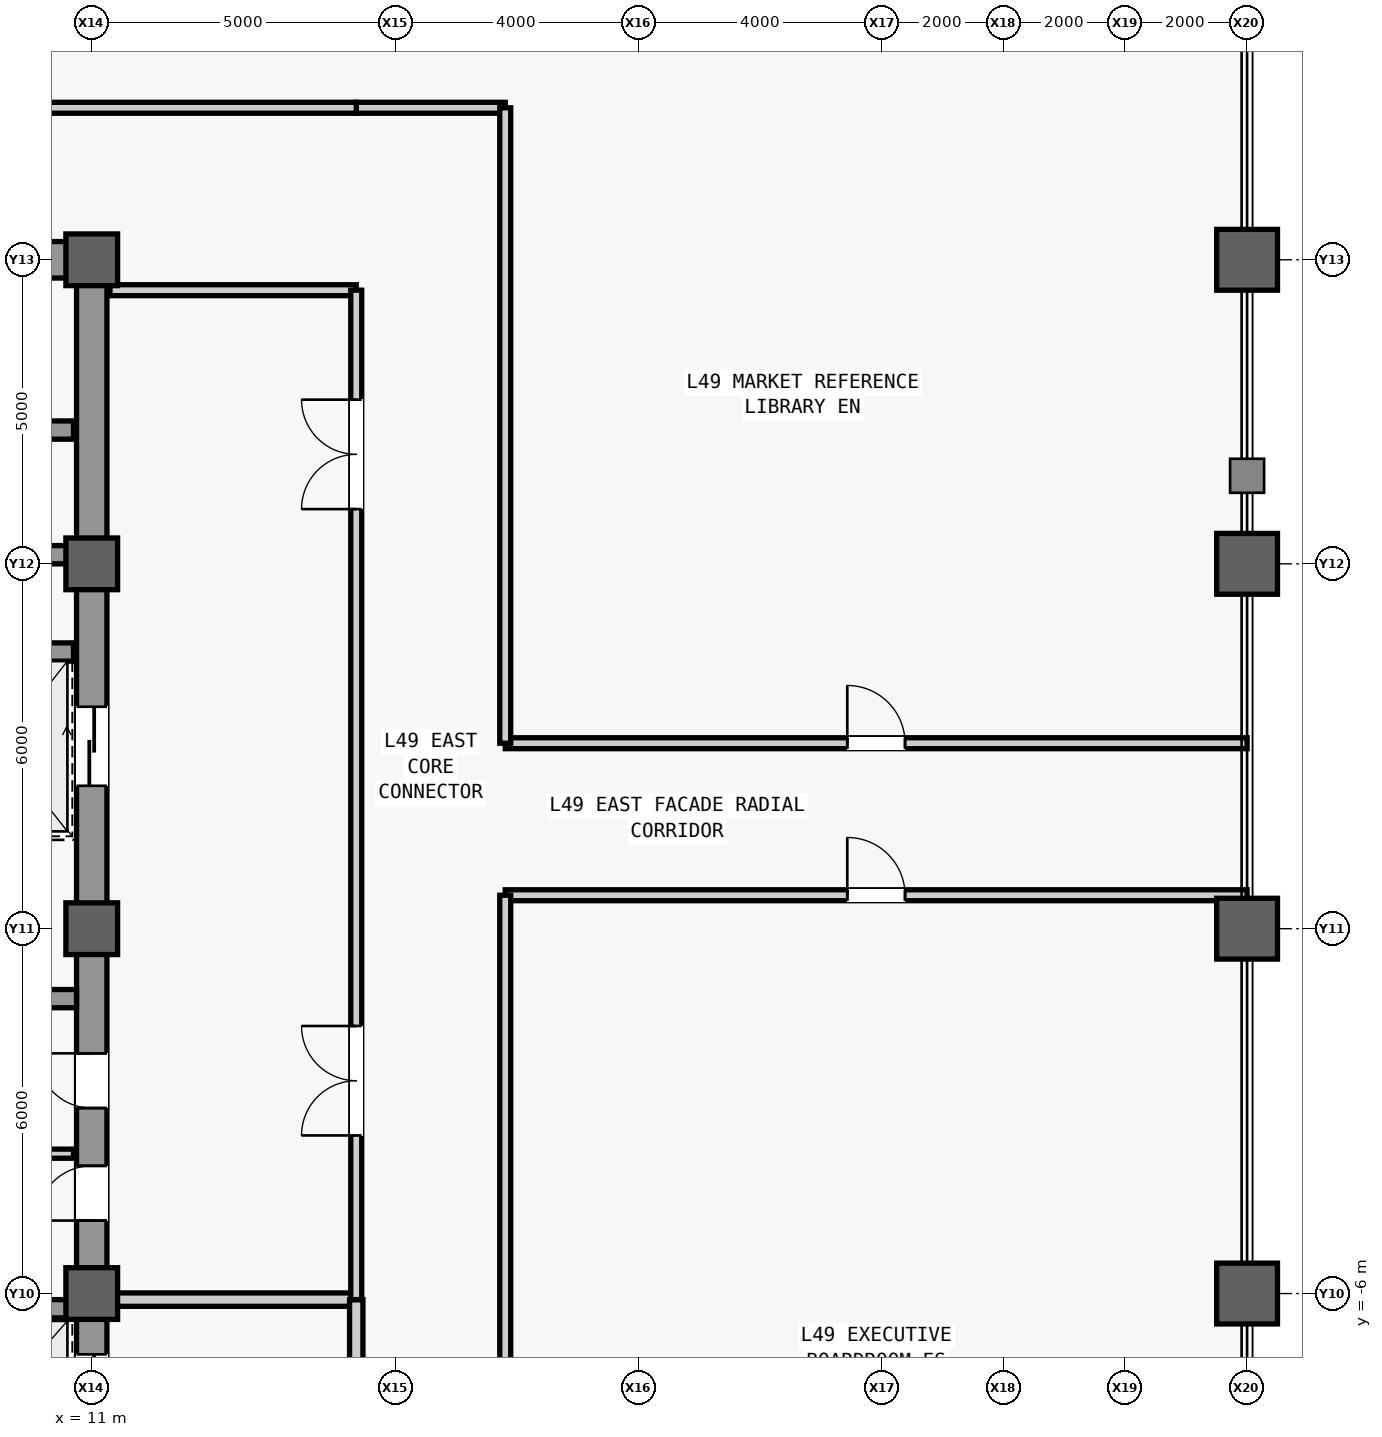
"""IFC4 building model, lengths in metres.
Left out: names, types, materials, properties, quantities, classifications, styles, units other than length and angle.
Written with IfcOpenShell. Run it as: python <this file> out.ifc"""

import sys

from ifc_helpers import new_model, si_unit, direction, frame, frame_2d, origin, origin_2d, place, context, subcontext, project, spatial, rectangle, hollow_rectangle, extrude, source, transform, mapped, element, fill, save


model = new_model("IFC4")
c1 = context("Model", 3, precision=1e-05, world=origin(), true_north=direction((0.0, 1.0)))
c2 = subcontext(c1, "Body", "Model", "MODEL_VIEW")
j1 = project(units=[si_unit("LENGTHUNIT", "METRE"), si_unit("PLANEANGLEUNIT", "RADIAN")], contexts=[c1])
p1 = place(None, origin())
s1 = spatial("IfcSite", under=j1, at=p1, CompositionType="ELEMENT")
p2 = place(p1, origin())
s2 = spatial("IfcBuilding", under=s1, at=p2, CompositionType="ELEMENT")
p3 = place(p2, frame((0.0, 0.0, 211.1)))
s3 = spatial("IfcBuildingStorey", under=s2, at=p3, CompositionType="ELEMENT", Elevation=211.1)
m1 = source(origin(), c2, "Body", "SweptSolid", [
    extrude(rectangle(XDim=22.0, YDim=0.5, at=frame_2d((11.0, 0.0))), origin(), (0.0, 0.0, 1.0), 3.78),
])
p4 = place(p3, frame((11.0, -11.0, 0.0), z_axis=(0.0, 0.0, 1.0), x_axis=(0.0, 1.0, 0.0)))
e1 = element("IfcWall", 1, at=p4, inside=s3, PredefinedType="SHEAR", context=c2, shape_type="MappedRepresentation", body=[
    mapped(m1, transform((0.0, 0.0, 0.0), scale=1.0)),
])
m2 = source(origin(), c2, "Body", "SweptSolid", [
    extrude(rectangle(XDim=1.1, YDim=2.2, at=frame_2d((0.55, 1.1))), frame((0.0, 0.26, 0.0), z_axis=(0.0, -1.0, 0.0), x_axis=(1.0, 0.0, 0.0)), (0.0, 0.0, 1.0), 0.52),
])
p5 = place(p4, frame((0.8, 0.0, 0.0)))
e2 = element("IfcOpeningElement", 2, at=p5, cuts=e1, PredefinedType="OPENING", context=c2, shape_type="MappedRepresentation", body=[
    mapped(m2, transform((0.0, 0.0, 0.0), scale=1.0)),
])
m3 = source(origin(), c2, "Body", "SweptSolid", [
    extrude(rectangle(XDim=0.9, YDim=2.15, at=frame_2d((0.45, 1.075))), frame((0.0, 0.26, 0.0), z_axis=(0.0, -1.0, 0.0), x_axis=(1.0, 0.0, 0.0)), (0.0, 0.0, 1.0), 0.52),
])
p6 = place(p4, frame((6.2, 0.0, 0.0)))
e3 = element("IfcOpeningElement", 3, at=p6, cuts=e1, PredefinedType="OPENING", context=c2, shape_type="MappedRepresentation", body=[
    mapped(m3, transform((0.0, 0.0, 0.0), scale=1.0)),
])
p7 = place(p4, frame((8.05, 0.0, 0.0)))
e4 = element("IfcOpeningElement", 4, at=p7, cuts=e1, PredefinedType="OPENING", context=c2, shape_type="MappedRepresentation", body=[
    mapped(m3, transform((0.0, 0.0, 0.0), scale=1.0)),
])
m4 = source(origin(), c2, "Body", "SweptSolid", [
    extrude(rectangle(XDim=1.3, YDim=2.3, at=frame_2d((0.65, 1.15))), frame((0.0, 0.26, 0.0), z_axis=(0.0, -1.0, 0.0), x_axis=(1.0, 0.0, 0.0)), (0.0, 0.0, 1.0), 0.52),
])
p8 = place(p4, frame((2.7, 0.0, 0.0)))
e5 = element("IfcOpeningElement", 5, at=p8, cuts=e1, PredefinedType="OPENING", context=c2, shape_type="MappedRepresentation", body=[
    mapped(m4, transform((0.0, 0.0, 0.0), scale=1.0)),
])
p9 = place(p4, frame((13.35, 0.0, 0.0)))
e6 = element("IfcOpeningElement", 6, at=p9, cuts=e1, PredefinedType="OPENING", context=c2, shape_type="MappedRepresentation", body=[
    mapped(m4, transform((0.0, 0.0, 0.0), scale=1.0)),
])
m5 = source(origin(), c2, "Body", "SweptSolid", [
    extrude(rectangle(XDim=5.9, YDim=0.6, at=frame_2d((2.95, 0.0))), origin(), (0.0, 0.0, 1.0), 3.78),
])
p10 = place(p3, frame((4.85, 11.0, 0.0), z_axis=(0.0, 0.0, 1.0), x_axis=(1.0, 0.0, 0.0)))
e7 = element("IfcWall", 7, at=p10, inside=s3, PredefinedType="SHEAR", context=c2, shape_type="MappedRepresentation", body=[
    mapped(m5, transform((0.0, 0.0, 0.0), scale=1.0)),
])
m6 = source(origin(), c2, "Body", "SweptSolid", [
    extrude(rectangle(XDim=1.05, YDim=2.2, at=frame_2d((0.525, 1.1))), frame((0.0, 0.31, 0.0), z_axis=(0.0, -1.0, 0.0), x_axis=(1.0, 0.0, 0.0)), (0.0, 0.0, 1.0), 0.62),
])
p11 = place(p10, frame((1.375, 0.0, 0.0)))
e8 = element("IfcOpeningElement", 8, at=p11, cuts=e7, PredefinedType="OPENING", context=c2, shape_type="MappedRepresentation", body=[
    mapped(m6, transform((0.0, 0.0, 0.0), scale=1.0)),
])
m7 = source(origin(), c2, "Body", "SweptSolid", [
    extrude(rectangle(XDim=5.65, YDim=0.3, at=frame_2d((2.825, 0.0))), origin(), (0.0, 0.0, 1.0), 3.78),
])
p12 = place(p3, frame((5.1, -1.15, 0.0), z_axis=(0.0, 0.0, 1.0), x_axis=(1.0, 0.0, 0.0)))
e9 = element("IfcWall", 9, at=p12, inside=s3, PredefinedType="SHEAR", context=c2, shape_type="MappedRepresentation", body=[
    mapped(m7, transform((0.0, 0.0, 0.0), scale=1.0)),
])
m8 = source(origin(), c2, "Body", "SweptSolid", [
    extrude(rectangle(XDim=0.85, YDim=0.85, at=origin_2d()), origin(), (0.0, 0.0, 1.0), 4.0),
])
for number, where, z_axis, x_axis in (
    (10, (11.0, -6.0, 0.0), (0.0, 0.0, 1.0), (1.0, 0.0, 0.0)),
    (11, (11.0, 0.0, 0.0), (0.0, 0.0, 1.0), (1.0, 0.0, 0.0)),
    (12, (11.0, 6.0, 0.0), (0.0, 0.0, 1.0), (1.0, 0.0, 0.0)),
    (13, (11.0, 11.0, 0.0), (0.0, 0.0, 1.0), (1.0, 0.0, 0.0)),
):
    element("IfcColumn", number, at=place(p3, frame(where, z_axis=z_axis, x_axis=x_axis)), inside=s3, PredefinedType="COLUMN", context=c2, shape_type="MappedRepresentation", body=[
        mapped(m8, transform((0.0, 0.0, 0.0), scale=1.0)),
    ])
m9 = source(origin(), c2, "Body", "SweptSolid", [
    extrude(hollow_rectangle(XDim=1.0, YDim=1.0, WallThickness=0.055, at=origin_2d()), origin(), (0.0, 0.0, 1.0), 4.0),
])
for number, where, z_axis, x_axis in (
    (14, (30.0, -6.0, 0.0), (0.0, 0.0, 1.0), (1.0, 0.0, 0.0)),
    (15, (30.0, 0.0, 0.0), (0.0, 0.0, 1.0), (1.0, 0.0, 0.0)),
    (16, (30.0, 6.0, 0.0), (0.0, 0.0, 1.0), (1.0, 0.0, 0.0)),
    (17, (30.0, 11.0, 0.0), (0.0, 0.0, 1.0), (1.0, 0.0, 0.0)),
):
    element("IfcColumn", number, at=place(p3, frame(where, z_axis=z_axis, x_axis=x_axis)), inside=s3, PredefinedType="COLUMN", context=c2, shape_type="MappedRepresentation", body=[
        mapped(m9, transform((0.0, 0.0, 0.0), scale=1.0)),
    ])
m10 = source(origin(), c2, "Body", "SweptSolid", [
    extrude(rectangle(XDim=2.2, YDim=0.3, at=frame_2d((1.1, 0.0))), origin(), (0.0, 0.0, 1.0), 3.78),
])
p13 = place(p3, frame((8.5, -6.25, 0.0), z_axis=(0.0, 0.0, 1.0), x_axis=(1.0, 0.0, 0.0)))
e18 = element("IfcWall", 18, at=p13, inside=s3, PredefinedType="SHEAR", context=c2, shape_type="MappedRepresentation", body=[
    mapped(m10, transform((0.0, 0.0, 0.0), scale=1.0)),
])
m11 = source(origin(), c2, "Body", "SweptSolid", [
    extrude(rectangle(XDim=2.3, YDim=0.3, at=frame_2d((1.15, 0.0))), origin(), (0.0, 0.0, 1.0), 3.78),
])
for number, where, z_axis, x_axis in (
    (19, (8.4, 4.55, 0.0), (0.0, 0.0, 1.0), (1.0, 0.0, 0.0)),
    (20, (8.4, 6.15, 0.0), (0.0, 0.0, 1.0), (1.0, 0.0, 0.0)),
    (21, (8.4, 8.2, 0.0), (0.0, 0.0, 1.0), (1.0, 0.0, 0.0)),
):
    element("IfcWall", number, at=place(p3, frame(where, z_axis=z_axis, x_axis=x_axis)), inside=s3, PredefinedType="SHEAR", context=c2, shape_type="MappedRepresentation", body=[
        mapped(m11, transform((0.0, 0.0, 0.0), scale=1.0)),
    ])
m12 = source(origin(), c2, "Body", "SweptSolid", [
    extrude(rectangle(XDim=2.05, YDim=0.15, at=frame_2d((1.025, 0.0))), origin(), (0.0, 0.0, 1.0), 3.78),
])
p14 = place(p3, frame((8.65, -3.7, 0.0), z_axis=(0.0, 0.0, 1.0), x_axis=(1.0, 0.0, 0.0)))
e22 = element("IfcWall", 22, at=p14, inside=s3, PredefinedType="PARTITIONING", context=c2, shape_type="MappedRepresentation", body=[
    mapped(m12, transform((0.0, 0.0, 0.0), scale=1.0)),
])
m13 = source(origin(), c2, "Body", "SweptSolid", [
    extrude(rectangle(XDim=4.05, YDim=0.22, at=frame_2d((2.025, 0.0))), origin(), (0.0, 0.0, 1.0), 3.085),
])
p15 = place(p3, frame((11.3, -6.1, 0.0), z_axis=(0.0, 0.0, 1.0), x_axis=(1.0, 0.0, 0.0)))
e23 = element("IfcWall", 23, at=p15, inside=s3, PredefinedType="PARTITIONING", context=c2, shape_type="MappedRepresentation", body=[
    mapped(m13, transform((0.0, 0.0, 0.0), scale=1.0)),
])
m14 = source(origin(), c2, "Body", "SweptSolid", [
    extrude(rectangle(XDim=4.4, YDim=0.22, at=frame_2d((2.2, 0.0))), origin(), (0.0, 0.0, 1.0), 3.78),
])
p16 = place(p3, frame((15.35, -10.5, 0.0), z_axis=(0.0, 0.0, 1.0), x_axis=(0.0, 1.0, 0.0)))
e24 = element("IfcWall", 24, at=p16, inside=s3, PredefinedType="PARTITIONING", context=c2, shape_type="MappedRepresentation", body=[
    mapped(m14, transform((0.0, 0.0, 0.0), scale=1.0)),
])
m15 = source(origin(), c2, "Body", "SweptSolid", [
    extrude(rectangle(XDim=1.2, YDim=2.2, at=frame_2d((0.6, 1.1))), frame((0.0, 0.12, 0.0), z_axis=(0.0, -1.0, 0.0), x_axis=(1.0, 0.0, 0.0)), (0.0, 0.0, 1.0), 0.24),
])
p17 = place(p16, frame((1.6, 0.0, 0.0)))
e25 = element("IfcOpeningElement", 25, at=p17, cuts=e24, PredefinedType="OPENING", context=c2, shape_type="MappedRepresentation", body=[
    mapped(m15, transform((0.0, 0.0, 0.0), scale=1.0)),
])
m16 = source(origin(), c2, "Body", "SweptSolid", [
    extrude(rectangle(XDim=4.05, YDim=0.18, at=frame_2d((2.025, 0.0))), origin(), (0.0, 0.0, 1.0), 3.78),
])
p18 = place(p3, frame((11.3, 10.5, 0.0), z_axis=(0.0, 0.0, 1.0), x_axis=(1.0, 0.0, 0.0)))
e26 = element("IfcWall", 26, at=p18, inside=s3, PredefinedType="PARTITIONING", context=c2, shape_type="MappedRepresentation", body=[
    mapped(m16, transform((0.0, 0.0, 0.0), scale=1.0)),
])
m17 = source(origin(), c2, "Body", "SweptSolid", [
    extrude(rectangle(XDim=16.6, YDim=0.18, at=frame_2d((8.3, 0.0))), origin(), (0.0, 0.0, 1.0), 3.78),
])
p19 = place(p3, frame((15.35, -6.1, 0.0), z_axis=(0.0, 0.0, 1.0), x_axis=(0.0, 1.0, 0.0)))
e27 = element("IfcWall", 27, at=p19, inside=s3, PredefinedType="PARTITIONING", context=c2, shape_type="MappedRepresentation", body=[
    mapped(m17, transform((0.0, 0.0, 0.0), scale=1.0)),
])
m18 = source(origin(), c2, "Body", "SweptSolid", [
    extrude(rectangle(XDim=1.8, YDim=2.25, at=frame_2d((0.9, 1.125))), frame((0.0, 0.1, 0.0), z_axis=(0.0, -1.0, 0.0), x_axis=(1.0, 0.0, 0.0)), (0.0, 0.0, 1.0), 0.2),
])
p20 = place(p19, frame((2.7, 0.0, 0.0)))
e28 = element("IfcOpeningElement", 28, at=p20, cuts=e27, PredefinedType="OPENING", context=c2, shape_type="MappedRepresentation", body=[
    mapped(m18, transform((0.0, 0.0, 0.0), scale=1.0)),
])
p21 = place(p19, frame((13.0, 0.0, 0.0)))
e29 = element("IfcOpeningElement", 29, at=p21, cuts=e27, PredefinedType="OPENING", context=c2, shape_type="MappedRepresentation", body=[
    mapped(m18, transform((0.0, 0.0, 0.0), scale=1.0)),
])
m19 = source(origin(), c2, "Body", "SweptSolid", [
    extrude(rectangle(XDim=2.45, YDim=0.18, at=frame_2d((1.225, 0.0))), origin(), (0.0, 0.0, 1.0), 3.78),
])
p22 = place(p3, frame((15.35, 13.5, 0.0), z_axis=(0.0, 0.0, 1.0), x_axis=(1.0, 0.0, 0.0)))
e30 = element("IfcWall", 30, at=p22, inside=s3, PredefinedType="PARTITIONING", context=c2, shape_type="MappedRepresentation", body=[
    mapped(m19, transform((0.0, 0.0, 0.0), scale=1.0)),
])
m20 = source(origin(), c2, "Body", "SweptSolid", [
    extrude(rectangle(XDim=25.45, YDim=0.18, at=frame_2d((12.725, 0.0))), origin(), (0.0, 0.0, 1.0), 3.78),
])
p23 = place(p3, frame((-10.1, 13.5, 0.0), z_axis=(0.0, 0.0, 1.0), x_axis=(1.0, 0.0, 0.0)))
e31 = element("IfcWall", 31, at=p23, inside=s3, PredefinedType="PARTITIONING", context=c2, shape_type="MappedRepresentation", body=[
    mapped(m20, transform((0.0, 0.0, 0.0), scale=1.0)),
])
m21 = source(origin(), c2, "Body", "SweptSolid", [
    extrude(rectangle(XDim=12.2, YDim=0.18, at=frame_2d((6.1, 0.0))), origin(), (0.0, 0.0, 1.0), 3.78),
])
p24 = place(p3, frame((17.8, 0.55, 0.0), z_axis=(0.0, 0.0, 1.0), x_axis=(1.0, 0.0, 0.0)))
e32 = element("IfcWall", 32, at=p24, inside=s3, PredefinedType="PARTITIONING", context=c2, shape_type="MappedRepresentation", body=[
    mapped(m21, transform((0.0, 0.0, 0.0), scale=1.0)),
])
m22 = source(origin(), c2, "Body", "SweptSolid", [
    extrude(rectangle(XDim=0.95, YDim=2.15, at=frame_2d((0.475, 1.075))), frame((0.0, 0.1, 0.0), z_axis=(0.0, -1.0, 0.0), x_axis=(1.0, 0.0, 0.0)), (0.0, 0.0, 1.0), 0.2),
])
p25 = place(p24, frame((5.625, 0.0, 0.0)))
e33 = element("IfcOpeningElement", 33, at=p25, cuts=e32, PredefinedType="OPENING", context=c2, shape_type="MappedRepresentation", body=[
    mapped(m22, transform((0.0, 0.0, 0.0), scale=1.0)),
])
m23 = source(origin(), c2, "Body", "SweptSolid", [
    extrude(rectangle(XDim=14.75, YDim=0.18, at=frame_2d((7.375, 0.0))), origin(), (0.0, 0.0, 1.0), 3.78),
])
p26 = place(p3, frame((17.8, -14.2, 0.0), z_axis=(0.0, 0.0, 1.0), x_axis=(0.0, 1.0, 0.0)))
e34 = element("IfcWall", 34, at=p26, inside=s3, PredefinedType="PARTITIONING", context=c2, shape_type="MappedRepresentation", body=[
    mapped(m23, transform((0.0, 0.0, 0.0), scale=1.0)),
])
p27 = place(p3, frame((17.8, 3.05, 0.0), z_axis=(0.0, 0.0, 1.0), x_axis=(1.0, 0.0, 0.0)))
e35 = element("IfcWall", 35, at=p27, inside=s3, PredefinedType="PARTITIONING", context=c2, shape_type="MappedRepresentation", body=[
    mapped(m21, transform((0.0, 0.0, 0.0), scale=1.0)),
])
p28 = place(p27, frame((5.625, 0.0, 0.0)))
e36 = element("IfcOpeningElement", 36, at=p28, cuts=e35, PredefinedType="OPENING", context=c2, shape_type="MappedRepresentation", body=[
    mapped(m22, transform((0.0, 0.0, 0.0), scale=1.0)),
])
m24 = source(origin(), c2, "Body", "SweptSolid", [
    extrude(rectangle(XDim=10.45, YDim=0.18, at=frame_2d((5.225, 0.0))), origin(), (0.0, 0.0, 1.0), 3.78),
])
p29 = place(p3, frame((17.8, 3.05, 0.0), z_axis=(0.0, 0.0, 1.0), x_axis=(0.0, 1.0, 0.0)))
e37 = element("IfcWall", 37, at=p29, inside=s3, PredefinedType="PARTITIONING", context=c2, shape_type="MappedRepresentation", body=[
    mapped(m24, transform((0.0, 0.0, 0.0), scale=1.0)),
])
m25 = source(origin(), c2, "Body", "SweptSolid", [
    extrude(rectangle(XDim=0.9, YDim=2.15, at=frame_2d((0.45, 1.075))), frame((0.0, 0.025, 0.0), z_axis=(0.0, -1.0, 0.0), x_axis=(1.0, 0.0, 0.0)), (0.0, 0.0, 1.0), 0.05),
])
p30 = place(p6, origin())
e38 = element("IfcDoor", 38, at=p30, inside=s3, OperationType="SINGLE_SWING_LEFT", PredefinedType="DOOR", context=c2, shape_type="MappedRepresentation", body=[
    mapped(m25, transform((0.0, 0.0, 0.0), scale=1.0)),
])
fill(e3, e38)
p31 = place(p7, origin())
e39 = element("IfcDoor", 39, at=p31, inside=s3, OperationType="SINGLE_SWING_RIGHT", PredefinedType="DOOR", context=c2, shape_type="MappedRepresentation", body=[
    mapped(m25, transform((0.0, 0.0, 0.0), scale=1.0)),
])
fill(e4, e39)
m26 = source(origin(), c2, "Body", "SweptSolid", [
    extrude(rectangle(XDim=1.8, YDim=2.25, at=frame_2d((0.9, 1.125))), frame((0.0, 0.025, 0.0), z_axis=(0.0, -1.0, 0.0), x_axis=(1.0, 0.0, 0.0)), (0.0, 0.0, 1.0), 0.05),
])
p32 = place(p20, origin())
e40 = element("IfcDoor", 40, at=p32, inside=s3, OperationType="SINGLE_SWING_RIGHT", PredefinedType="DOOR", context=c2, shape_type="MappedRepresentation", body=[
    mapped(m26, transform((0.0, 0.0, 0.0), scale=1.0)),
])
fill(e28, e40)
p33 = place(p21, origin())
e41 = element("IfcDoor", 41, at=p33, inside=s3, OperationType="SINGLE_SWING_LEFT", PredefinedType="DOOR", context=c2, shape_type="MappedRepresentation", body=[
    mapped(m26, transform((0.0, 0.0, 0.0), scale=1.0)),
])
fill(e29, e41)
m27 = source(origin(), c2, "Body", "SweptSolid", [
    extrude(rectangle(XDim=0.95, YDim=2.15, at=frame_2d((0.475, 1.075))), frame((0.0, 0.025, 0.0), z_axis=(0.0, -1.0, 0.0), x_axis=(1.0, 0.0, 0.0)), (0.0, 0.0, 1.0), 0.05),
])
p34 = place(p25, origin())
e42 = element("IfcDoor", 42, at=p34, inside=s3, OperationType="SINGLE_SWING_LEFT", PredefinedType="DOOR", context=c2, shape_type="MappedRepresentation", body=[
    mapped(m27, transform((0.0, 0.0, 0.0), scale=1.0)),
])
fill(e33, e42)
p35 = place(p28, origin())
e43 = element("IfcDoor", 43, at=p35, inside=s3, OperationType="SINGLE_SWING_LEFT", PredefinedType="DOOR", context=c2, shape_type="MappedRepresentation", body=[
    mapped(m27, transform((0.0, 0.0, 0.0), scale=1.0)),
])
fill(e36, e43)
m28 = source(origin(), c2, "Body", "SweptSolid", [
    extrude(rectangle(XDim=1.3, YDim=2.3, at=frame_2d((0.65, 1.15))), frame((0.0, 0.025, 0.0), z_axis=(0.0, -1.0, 0.0), x_axis=(1.0, 0.0, 0.0)), (0.0, 0.0, 1.0), 0.05),
])
p36 = place(p8, origin())
e44 = element("IfcDoor", 44, at=p36, inside=s3, OperationType="SLIDING_TO_LEFT", PredefinedType="DOOR", context=c2, shape_type="MappedRepresentation", body=[
    mapped(m28, transform((0.0, 0.0, 0.0), scale=1.0)),
])
fill(e5, e44)
p37 = place(p9, origin())
e45 = element("IfcDoor", 45, at=p37, inside=s3, OperationType="SLIDING_TO_LEFT", PredefinedType="DOOR", context=c2, shape_type="MappedRepresentation", body=[
    mapped(m28, transform((0.0, 0.0, 0.0), scale=1.0)),
])
fill(e6, e45)
save(model, sys.argv[1])
